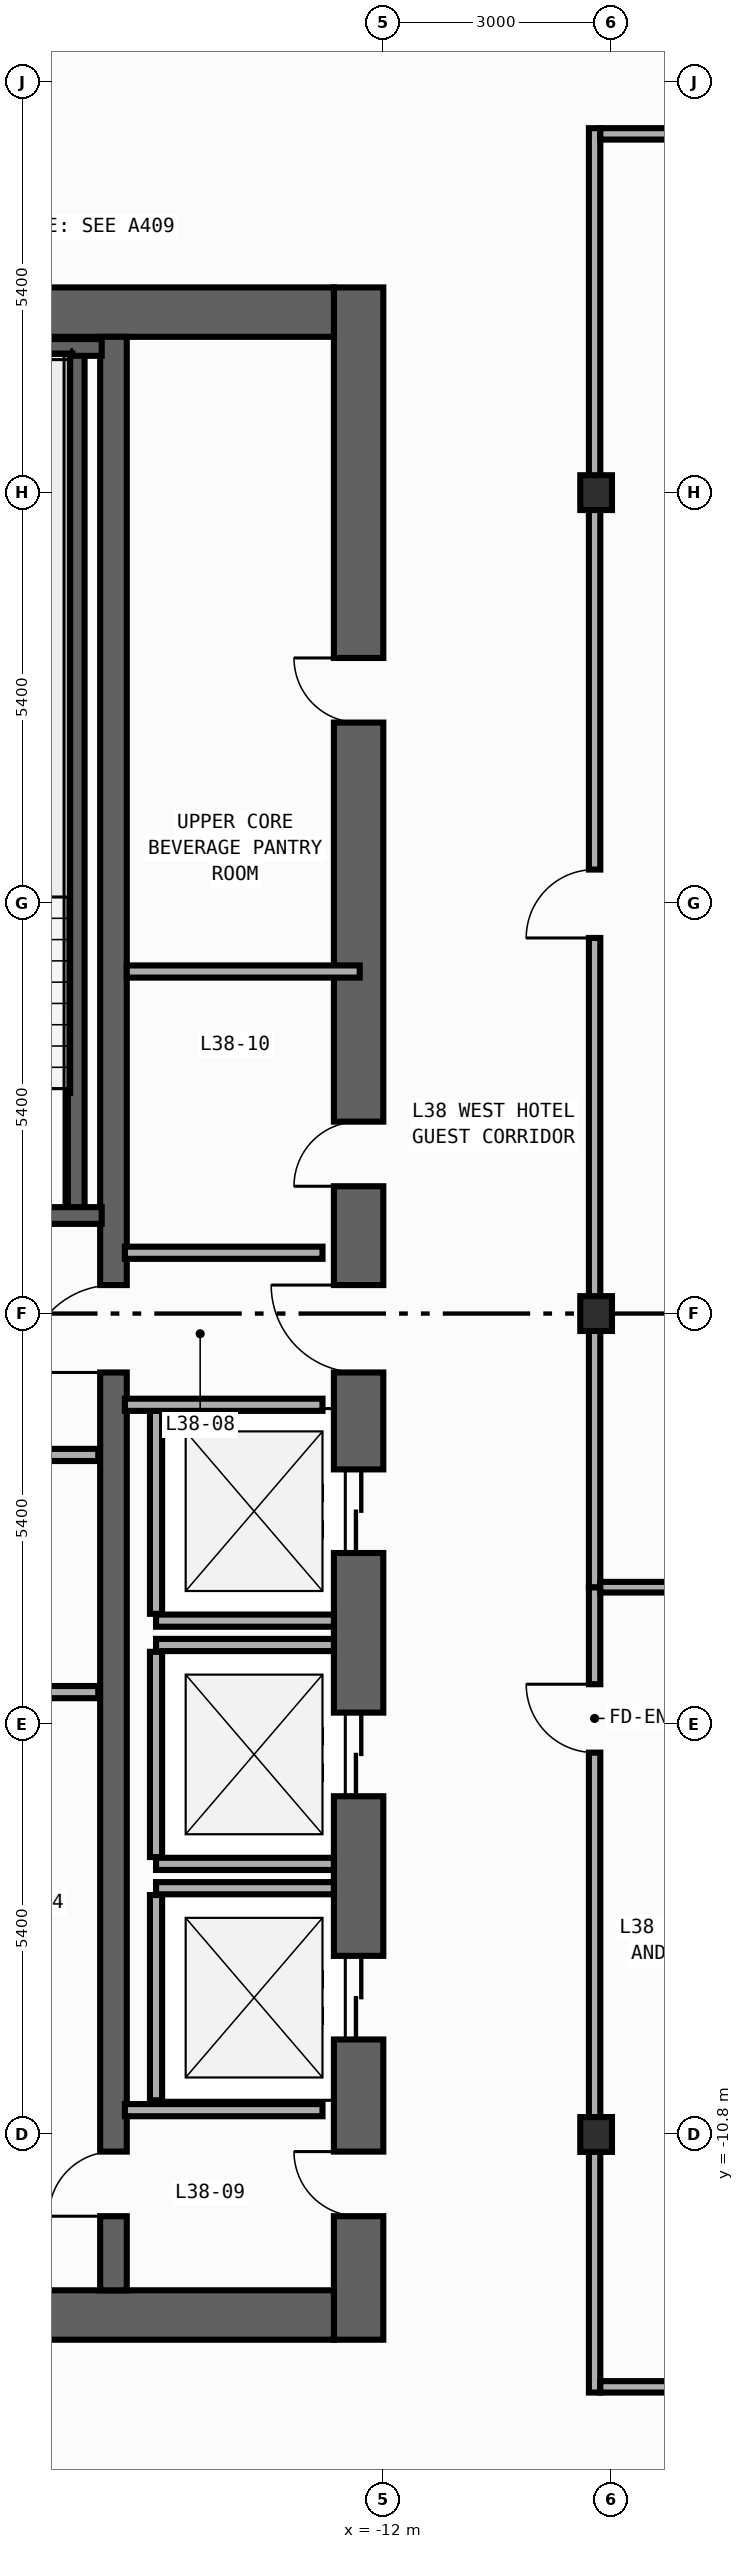
"""IFC4 building model, lengths in metres.
Left out: names, types, materials, properties, quantities, classifications, styles, units other than length and angle.
Written with IfcOpenShell. Run it as: python <this file> out.ifc"""

import sys

from ifc_helpers import new_model, si_unit, direction, frame, frame_2d, origin, origin_2d, place, context, subcontext, project, spatial, rectangle, i_section, extrude, element, fill, save


model = new_model("IFC4")
c1 = context("Model", 3, precision=1e-05, world=origin(), true_north=direction((0.0, 1.0)))
c2 = subcontext(c1, "Body", "Model", "MODEL_VIEW")
j1 = project(units=[si_unit("LENGTHUNIT", "METRE"), si_unit("PLANEANGLEUNIT", "RADIAN")], contexts=[c1])
p1 = place(None, origin())
s1 = spatial("IfcSite", under=j1, at=p1, CompositionType="ELEMENT")
p2 = place(p1, origin())
s2 = spatial("IfcBuilding", under=s1, at=p2, CompositionType="ELEMENT")
p3 = place(p2, frame((0.0, 0.0, 168.8)))
s3 = spatial("IfcBuildingStorey", under=s2, at=p3, CompositionType="ELEMENT", Elevation=168.8)
p4 = place(p3, frame((-12.325, -13.5, 0.0), z_axis=(0.0, 0.0, 1.0), x_axis=(0.0, 1.0, 0.0)))
e1 = element("IfcWall", 1, at=p4, inside=s3, PredefinedType="SHEAR", context=c2, shape_type="SweptSolid", body=[
    extrude(rectangle(XDim=27.0, YDim=0.65, at=frame_2d((13.5, 0.0))), origin(), (0.0, 0.0, 1.0), 3.54),
])
p5 = place(p4, frame((10.35, 0.0, 0.0)))
e2 = element("IfcOpeningElement", 2, at=p5, cuts=e1, PredefinedType="OPENING", context=c2, shape_type="SweptSolid", body=[
    extrude(rectangle(XDim=1.1, YDim=2.2, at=frame_2d((0.55, 1.1))), frame((0.0, 0.335, 0.0), z_axis=(0.0, -1.0, 0.0), x_axis=(1.0, 0.0, 0.0)), (0.0, 0.0, 1.0), 0.67),
])
p6 = place(p4, frame((7.15, 0.0, 0.0)))
e3 = element("IfcOpeningElement", 3, at=p6, cuts=e1, PredefinedType="OPENING", context=c2, shape_type="SweptSolid", body=[
    extrude(rectangle(XDim=1.1, YDim=2.2, at=frame_2d((0.55, 1.1))), frame((0.0, 0.335, 0.0), z_axis=(0.0, -1.0, 0.0), x_axis=(1.0, 0.0, 0.0)), (0.0, 0.0, 1.0), 0.67),
])
p7 = place(p4, frame((3.95, 0.0, 0.0)))
e4 = element("IfcOpeningElement", 4, at=p7, cuts=e1, PredefinedType="OPENING", context=c2, shape_type="SweptSolid", body=[
    extrude(rectangle(XDim=1.1, YDim=2.2, at=frame_2d((0.55, 1.1))), frame((0.0, 0.335, 0.0), z_axis=(0.0, -1.0, 0.0), x_axis=(1.0, 0.0, 0.0)), (0.0, 0.0, 1.0), 0.67),
])
p8 = place(p4, frame((15.175, 0.0, 0.0)))
e5 = element("IfcOpeningElement", 5, at=p8, cuts=e1, PredefinedType="OPENING", context=c2, shape_type="SweptSolid", body=[
    extrude(rectangle(XDim=0.85, YDim=2.1, at=frame_2d((0.425, 1.05))), frame((0.0, 0.335, 0.0), z_axis=(0.0, -1.0, 0.0), x_axis=(1.0, 0.0, 0.0)), (0.0, 0.0, 1.0), 0.67),
])
p9 = place(p4, frame((21.275, 0.0, 0.0)))
e6 = element("IfcOpeningElement", 6, at=p9, cuts=e1, PredefinedType="OPENING", context=c2, shape_type="SweptSolid", body=[
    extrude(rectangle(XDim=0.85, YDim=2.1, at=frame_2d((0.425, 1.05))), frame((0.0, 0.335, 0.0), z_axis=(0.0, -1.0, 0.0), x_axis=(1.0, 0.0, 0.0)), (0.0, 0.0, 1.0), 0.67),
])
p10 = place(p4, frame((12.725, 0.0, 0.0)))
e7 = element("IfcOpeningElement", 7, at=p10, cuts=e1, PredefinedType="OPENING", context=c2, shape_type="SweptSolid", body=[
    extrude(rectangle(XDim=1.15, YDim=2.2, at=frame_2d((0.575, 1.1))), frame((0.0, 0.335, 0.0), z_axis=(0.0, -1.0, 0.0), x_axis=(1.0, 0.0, 0.0)), (0.0, 0.0, 1.0), 0.67),
])
p11 = place(p4, frame((1.625, 0.0, 0.0)))
e8 = element("IfcOpeningElement", 8, at=p11, cuts=e1, PredefinedType="OPENING", context=c2, shape_type="SweptSolid", body=[
    extrude(rectangle(XDim=0.85, YDim=2.1, at=frame_2d((0.425, 1.05))), frame((0.0, 0.335, 0.0), z_axis=(0.0, -1.0, 0.0), x_axis=(1.0, 0.0, 0.0)), (0.0, 0.0, 1.0), 0.67),
])
for number, where, z_axis, x_axis in (
    (9, (-19.75, -13.175, 0.0), (0.0, 0.0, 1.0), (1.0, 0.0, 0.0)),
    (10, (-19.75, 13.175, 0.0), (0.0, 0.0, 1.0), (1.0, 0.0, 0.0)),
):
    element("IfcWall", number, at=place(p3, frame(where, z_axis=z_axis, x_axis=x_axis)), inside=s3, PredefinedType="SHEAR", context=c2, shape_type="SweptSolid", body=[
        extrude(rectangle(XDim=7.1, YDim=0.65, at=frame_2d((3.55, 0.0))), origin(), (0.0, 0.0, 1.0), 3.54),
    ])
p12 = place(p3, frame((-15.55, -12.85, 0.0), z_axis=(0.0, 0.0, 1.0), x_axis=(0.0, 1.0, 0.0)))
e11 = element("IfcWall", 11, at=p12, inside=s3, PredefinedType="SHEAR", context=c2, shape_type="SweptSolid", body=[
    extrude(rectangle(XDim=25.7, YDim=0.35, at=frame_2d((12.85, 0.0))), origin(), (0.0, 0.0, 1.0), 3.54),
])
p13 = place(p12, frame((12.075, 0.0, 0.0)))
e12 = element("IfcOpeningElement", 12, at=p13, cuts=e11, PredefinedType="OPENING", context=c2, shape_type="SweptSolid", body=[
    extrude(rectangle(XDim=1.15, YDim=2.2, at=frame_2d((0.575, 1.1))), frame((0.0, 0.185, 0.0), z_axis=(0.0, -1.0, 0.0), x_axis=(1.0, 0.0, 0.0)), (0.0, 0.0, 1.0), 0.37),
])
p14 = place(p12, frame((0.975, 0.0, 0.0)))
e13 = element("IfcOpeningElement", 13, at=p14, cuts=e11, PredefinedType="OPENING", context=c2, shape_type="SweptSolid", body=[
    extrude(rectangle(XDim=0.85, YDim=2.1, at=frame_2d((0.425, 1.05))), frame((0.0, 0.185, 0.0), z_axis=(0.0, -1.0, 0.0), x_axis=(1.0, 0.0, 0.0)), (0.0, 0.0, 1.0), 0.37),
])
p15 = place(p3, frame((-16.04, 1.29, 0.0), z_axis=(0.0, 0.0, 1.0), x_axis=(0.0, 1.0, 0.0)))
e14 = element("IfcWall", 14, at=p15, inside=s3, PredefinedType="SHEAR", context=c2, shape_type="SweptSolid", body=[
    extrude(rectangle(XDim=11.42, YDim=0.22, at=frame_2d((5.71, 0.0))), origin(), (0.0, 0.0, 1.0), 3.54),
])
p16 = place(p3, frame((-19.77, 12.71, 0.0), z_axis=(0.0, 0.0, 1.0), x_axis=(1.0, 0.0, 0.0)))
e15 = element("IfcWall", 15, at=p16, inside=s3, PredefinedType="SHEAR", context=c2, shape_type="SweptSolid", body=[
    extrude(rectangle(XDim=4.065, YDim=0.22, at=frame_2d((2.032, 0.0))), origin(), (0.0, 0.0, 1.0), 3.54),
])
p17 = place(p3, frame((-19.77, 1.29, 0.0), z_axis=(0.0, 0.0, 1.0), x_axis=(1.0, 0.0, 0.0)))
e16 = element("IfcWall", 16, at=p17, inside=s3, PredefinedType="SHEAR", context=c2, shape_type="SweptSolid", body=[
    extrude(rectangle(XDim=4.065, YDim=0.22, at=frame_2d((2.032, 0.0))), origin(), (0.0, 0.0, 1.0), 3.54),
])
p18 = place(p17, frame((1.08, 0.0, 0.0)))
e17 = element("IfcOpeningElement", 17, at=p18, cuts=e16, PredefinedType="OPENING", context=c2, shape_type="SweptSolid", body=[
    extrude(rectangle(XDim=1.1, YDim=2.2, at=frame_2d((0.55, 1.1))), frame((0.0, 0.12, 0.0), z_axis=(0.0, -1.0, 0.0), x_axis=(1.0, 0.0, 0.0)), (0.0, 0.0, 1.0), 0.24),
])
for number, where, z_axis, x_axis in (
    (18, (-9.2, -10.8, 0.0), (0.0, 0.0, 1.0), (1.0, 0.0, 0.0)),
    (19, (-9.2, 0.0, 0.0), (0.0, 0.0, 1.0), (1.0, 0.0, 0.0)),
    (20, (-9.2, 10.8, 0.0), (0.0, 0.0, 1.0), (1.0, 0.0, 0.0)),
):
    element("IfcColumn", number, at=place(p3, frame(where, z_axis=z_axis, x_axis=x_axis)), inside=s3, PredefinedType="COLUMN", context=c2, shape_type="SweptSolid", body=[
        extrude(i_section(OverallWidth=0.417, OverallDepth=0.458, WebThickness=0.03, FlangeThickness=0.05, FilletRadius=0.022, at=origin_2d()), origin(), (0.0, 0.0, 1.0), 3.8),
    ])
p19 = place(p3, frame((-14.99, -4.04, 0.0), z_axis=(0.0, 0.0, 1.0), x_axis=(1.0, 0.0, 0.0)))
e21 = element("IfcWall", 21, at=p19, inside=s3, PredefinedType="STANDARD", context=c2, shape_type="SweptSolid", body=[
    extrude(rectangle(XDim=2.34, YDim=0.16, at=frame_2d((1.17, 0.0))), origin(), (0.0, 0.0, 1.0), 3.54),
])
p20 = place(p3, frame((-14.99, -3.95, 0.0), z_axis=(0.0, 0.0, 1.0), x_axis=(0.0, 1.0, 0.0)))
e22 = element("IfcWall", 22, at=p20, inside=s3, PredefinedType="STANDARD", context=c2, shape_type="SweptSolid", body=[
    extrude(rectangle(XDim=2.7, YDim=0.16, at=frame_2d((1.35, 0.0))), origin(), (0.0, 0.0, 1.0), 3.54),
])
for number, where, z_axis, x_axis in (
    (23, (-14.99, -7.24, 0.0), (0.0, 0.0, 1.0), (1.0, 0.0, 0.0)),
    (24, (-14.99, -4.36, 0.0), (0.0, 0.0, 1.0), (1.0, 0.0, 0.0)),
):
    element("IfcWall", number, at=place(p3, frame(where, z_axis=z_axis, x_axis=x_axis)), inside=s3, PredefinedType="STANDARD", context=c2, shape_type="SweptSolid", body=[
        extrude(rectangle(XDim=2.34, YDim=0.16, at=frame_2d((1.17, 0.0))), origin(), (0.0, 0.0, 1.0), 3.54),
    ])
p21 = place(p3, frame((-14.99, -7.15, 0.0), z_axis=(0.0, 0.0, 1.0), x_axis=(0.0, 1.0, 0.0)))
e25 = element("IfcWall", 25, at=p21, inside=s3, PredefinedType="STANDARD", context=c2, shape_type="SweptSolid", body=[
    extrude(rectangle(XDim=2.7, YDim=0.16, at=frame_2d((1.35, 0.0))), origin(), (0.0, 0.0, 1.0), 3.54),
])
p22 = place(p3, frame((-14.99, -7.56, 0.0), z_axis=(0.0, 0.0, 1.0), x_axis=(1.0, 0.0, 0.0)))
e26 = element("IfcWall", 26, at=p22, inside=s3, PredefinedType="STANDARD", context=c2, shape_type="SweptSolid", body=[
    extrude(rectangle(XDim=2.34, YDim=0.16, at=frame_2d((1.17, 0.0))), origin(), (0.0, 0.0, 1.0), 3.54),
])
p23 = place(p3, frame((-14.99, -10.35, 0.0), z_axis=(0.0, 0.0, 1.0), x_axis=(0.0, 1.0, 0.0)))
e27 = element("IfcWall", 27, at=p23, inside=s3, PredefinedType="STANDARD", context=c2, shape_type="SweptSolid", body=[
    extrude(rectangle(XDim=2.7, YDim=0.16, at=frame_2d((1.35, 0.0))), origin(), (0.0, 0.0, 1.0), 3.54),
])
p24 = place(p3, frame((-19.55, -1.86, 0.0), z_axis=(0.0, 0.0, 1.0), x_axis=(1.0, 0.0, 0.0)))
e28 = element("IfcWall", 28, at=p24, inside=s3, PredefinedType="STANDARD", context=c2, shape_type="SweptSolid", body=[
    extrude(rectangle(XDim=3.8, YDim=0.16, at=frame_2d((1.9, 0.0))), origin(), (0.0, 0.0, 1.0), 3.54),
])
p25 = place(p24, frame((1.18, 0.0, 0.0)))
e29 = element("IfcOpeningElement", 29, at=p25, cuts=e28, PredefinedType="OPENING", context=c2, shape_type="SweptSolid", body=[
    extrude(rectangle(XDim=1.15, YDim=2.2, at=frame_2d((0.575, 1.1))), frame((0.0, 0.09, 0.0), z_axis=(0.0, -1.0, 0.0), x_axis=(1.0, 0.0, 0.0)), (0.0, 0.0, 1.0), 0.18),
])
p26 = place(p3, frame((-19.55, -4.98, 0.0), z_axis=(0.0, 0.0, 1.0), x_axis=(1.0, 0.0, 0.0)))
e30 = element("IfcWall", 30, at=p26, inside=s3, PredefinedType="STANDARD", context=c2, shape_type="SweptSolid", body=[
    extrude(rectangle(XDim=3.8, YDim=0.16, at=frame_2d((1.9, 0.0))), origin(), (0.0, 0.0, 1.0), 3.54),
])
for number, where, z_axis, x_axis in (
    (31, (-15.4, 0.8, 0.0), (0.0, 0.0, 1.0), (1.0, 0.0, 0.0)),
    (32, (-15.4, -1.2, 0.0), (0.0, 0.0, 1.0), (1.0, 0.0, 0.0)),
    (33, (-15.4, -10.48, 0.0), (0.0, 0.0, 1.0), (1.0, 0.0, 0.0)),
):
    element("IfcWall", number, at=place(p3, frame(where, z_axis=z_axis, x_axis=x_axis)), inside=s3, PredefinedType="STANDARD", context=c2, shape_type="SweptSolid", body=[
        extrude(rectangle(XDim=2.6, YDim=0.16, at=frame_2d((1.3, 0.0))), origin(), (0.0, 0.0, 1.0), 3.54),
    ])
p27 = place(p3, frame((-15.375, 4.5, 0.0), z_axis=(0.0, 0.0, 1.0), x_axis=(1.0, 0.0, 0.0)))
e34 = element("IfcWall", 34, at=p27, inside=s3, PredefinedType="PARTITIONING", context=c2, shape_type="SweptSolid", body=[
    extrude(rectangle(XDim=3.065, YDim=0.16, at=frame_2d((1.532, 0.0))), origin(), (0.0, 0.0, 1.0), 3.54),
])
p28 = place(p3, frame((-9.22, -14.195, 0.0), z_axis=(0.0, 0.0, 1.0), x_axis=(0.0, 1.0, 0.0)))
e35 = element("IfcWall", 35, at=p28, inside=s3, PredefinedType="PARTITIONING", context=c2, shape_type="SweptSolid", body=[
    extrude(rectangle(XDim=10.595, YDim=0.15, at=frame_2d((5.297, 0.0))), origin(), (0.0, 0.0, 1.0), 2.952),
])
p29 = place(p28, frame((8.419, 0.0, 0.0)))
e36 = element("IfcOpeningElement", 36, at=p29, cuts=e35, PredefinedType="OPENING", context=c2, shape_type="SweptSolid", body=[
    extrude(rectangle(XDim=0.9, YDim=2.15, at=frame_2d((0.45, 1.075))), frame((0.0, 0.085, 0.0), z_axis=(0.0, -1.0, 0.0), x_axis=(1.0, 0.0, 0.0)), (0.0, 0.0, 1.0), 0.17),
])
p30 = place(p3, frame((-9.22, -3.6, 0.0), z_axis=(0.0, 0.0, 1.0), x_axis=(0.0, 1.0, 0.0)))
e37 = element("IfcWall", 37, at=p30, inside=s3, PredefinedType="PARTITIONING", context=c2, shape_type="SweptSolid", body=[
    extrude(rectangle(XDim=19.195, YDim=0.15, at=frame_2d((9.598, 0.0))), origin(), (0.0, 0.0, 1.0), 2.952),
])
p31 = place(p30, frame((8.542, 0.0, 0.0)))
e38 = element("IfcOpeningElement", 38, at=p31, cuts=e37, PredefinedType="OPENING", context=c2, shape_type="SweptSolid", body=[
    extrude(rectangle(XDim=0.9, YDim=2.15, at=frame_2d((0.45, 1.075))), frame((0.0, 0.085, 0.0), z_axis=(0.0, -1.0, 0.0), x_axis=(1.0, 0.0, 0.0)), (0.0, 0.0, 1.0), 0.17),
])
p32 = place(p3, frame((-9.145, 15.52, 0.0), z_axis=(0.0, 0.0, 1.0), x_axis=(1.0, 0.0, 0.0)))
e39 = element("IfcWall", 39, at=p32, inside=s3, PredefinedType="PARTITIONING", context=c2, shape_type="SweptSolid", body=[
    extrude(rectangle(XDim=18.29, YDim=0.15, at=frame_2d((9.145, 0.0))), origin(), (0.0, 0.0, 1.0), 3.54),
])
p33 = place(p32, frame((15.725, 0.0, 0.0)))
e40 = element("IfcOpeningElement", 40, at=p33, cuts=e39, PredefinedType="OPENING", context=c2, shape_type="SweptSolid", body=[
    extrude(rectangle(XDim=0.9, YDim=2.15, at=frame_2d((0.45, 1.075))), frame((0.0, 0.085, 0.0), z_axis=(0.0, -1.0, 0.0), x_axis=(1.0, 0.0, 0.0)), (0.0, 0.0, 1.0), 0.17),
])
p34 = place(p3, frame((-9.145, -14.12, 0.0), z_axis=(0.0, 0.0, 1.0), x_axis=(1.0, 0.0, 0.0)))
e41 = element("IfcWall", 41, at=p34, inside=s3, PredefinedType="PARTITIONING", context=c2, shape_type="SweptSolid", body=[
    extrude(rectangle(XDim=3.025, YDim=0.15, at=frame_2d((1.512, 0.0))), origin(), (0.0, 0.0, 1.0), 3.54),
])
p35 = place(p34, frame((1.665, 0.0, 0.0)))
e42 = element("IfcOpeningElement", 42, at=p35, cuts=e41, PredefinedType="OPENING", context=c2, shape_type="SweptSolid", body=[
    extrude(rectangle(XDim=0.9, YDim=2.15, at=frame_2d((0.45, 1.075))), frame((0.0, 0.085, 0.0), z_axis=(0.0, -1.0, 0.0), x_axis=(1.0, 0.0, 0.0)), (0.0, 0.0, 1.0), 0.17),
])
p36 = place(p3, frame((-9.145, -3.6, 0.0), z_axis=(0.0, 0.0, 1.0), x_axis=(1.0, 0.0, 0.0)))
e43 = element("IfcWall", 43, at=p36, inside=s3, PredefinedType="PARTITIONING", context=c2, shape_type="SweptSolid", body=[
    extrude(rectangle(XDim=3.025, YDim=0.14, at=frame_2d((1.512, 0.0))), origin(), (0.0, 0.0, 1.0), 3.54),
])
p37 = place(p5, origin())
e44 = element("IfcDoor", 44, at=p37, inside=s3, OperationType="DOUBLE_DOOR_SLIDING", PredefinedType="DOOR", context=c2, shape_type="SweptSolid", body=[
    extrude(rectangle(XDim=1.1, YDim=2.2, at=frame_2d((0.55, 1.1))), frame((0.0, 0.025, 0.0), z_axis=(0.0, -1.0, 0.0), x_axis=(1.0, 0.0, 0.0)), (0.0, 0.0, 1.0), 0.05),
])
fill(e2, e44)
p38 = place(p6, origin())
e45 = element("IfcDoor", 45, at=p38, inside=s3, OperationType="DOUBLE_DOOR_SLIDING", PredefinedType="DOOR", context=c2, shape_type="SweptSolid", body=[
    extrude(rectangle(XDim=1.1, YDim=2.2, at=frame_2d((0.55, 1.1))), frame((0.0, 0.025, 0.0), z_axis=(0.0, -1.0, 0.0), x_axis=(1.0, 0.0, 0.0)), (0.0, 0.0, 1.0), 0.05),
])
fill(e3, e45)
p39 = place(p7, origin())
e46 = element("IfcDoor", 46, at=p39, inside=s3, OperationType="DOUBLE_DOOR_SLIDING", PredefinedType="DOOR", context=c2, shape_type="SweptSolid", body=[
    extrude(rectangle(XDim=1.1, YDim=2.2, at=frame_2d((0.55, 1.1))), frame((0.0, 0.025, 0.0), z_axis=(0.0, -1.0, 0.0), x_axis=(1.0, 0.0, 0.0)), (0.0, 0.0, 1.0), 0.05),
])
fill(e4, e46)
p40 = place(p8, origin())
e47 = element("IfcDoor", 47, at=p40, inside=s3, OperationType="SINGLE_SWING_LEFT", PredefinedType="DOOR", context=c2, shape_type="SweptSolid", body=[
    extrude(rectangle(XDim=0.85, YDim=2.1, at=frame_2d((0.425, 1.05))), frame((0.0, 0.025, 0.0), z_axis=(0.0, -1.0, 0.0), x_axis=(1.0, 0.0, 0.0)), (0.0, 0.0, 1.0), 0.05),
])
fill(e5, e47)
p41 = place(p9, origin())
e48 = element("IfcDoor", 48, at=p41, inside=s3, OperationType="SINGLE_SWING_RIGHT", PredefinedType="DOOR", context=c2, shape_type="SweptSolid", body=[
    extrude(rectangle(XDim=0.85, YDim=2.1, at=frame_2d((0.425, 1.05))), frame((0.0, 0.025, 0.0), z_axis=(0.0, -1.0, 0.0), x_axis=(1.0, 0.0, 0.0)), (0.0, 0.0, 1.0), 0.05),
])
fill(e6, e48)
p42 = place(p10, origin())
e49 = element("IfcDoor", 49, at=p42, inside=s3, OperationType="SINGLE_SWING_RIGHT", PredefinedType="DOOR", context=c2, shape_type="SweptSolid", body=[
    extrude(rectangle(XDim=1.15, YDim=2.2, at=frame_2d((0.575, 1.1))), frame((0.0, 0.025, 0.0), z_axis=(0.0, -1.0, 0.0), x_axis=(1.0, 0.0, 0.0)), (0.0, 0.0, 1.0), 0.05),
])
fill(e7, e49)
p43 = place(p13, origin())
e50 = element("IfcDoor", 50, at=p43, inside=s3, OperationType="SINGLE_SWING_LEFT", PredefinedType="DOOR", context=c2, shape_type="SweptSolid", body=[
    extrude(rectangle(XDim=1.15, YDim=2.2, at=frame_2d((0.575, 1.1))), frame((0.0, 0.025, 0.0), z_axis=(0.0, -1.0, 0.0), x_axis=(1.0, 0.0, 0.0)), (0.0, 0.0, 1.0), 0.05),
])
fill(e12, e50)
p44 = place(p11, origin())
e51 = element("IfcDoor", 51, at=p44, inside=s3, OperationType="SINGLE_SWING_RIGHT", PredefinedType="DOOR", context=c2, shape_type="SweptSolid", body=[
    extrude(rectangle(XDim=0.85, YDim=2.1, at=frame_2d((0.425, 1.05))), frame((0.0, 0.025, 0.0), z_axis=(0.0, -1.0, 0.0), x_axis=(1.0, 0.0, 0.0)), (0.0, 0.0, 1.0), 0.05),
])
fill(e8, e51)
p45 = place(p14, origin())
e52 = element("IfcDoor", 52, at=p45, inside=s3, OperationType="SINGLE_SWING_LEFT", PredefinedType="DOOR", context=c2, shape_type="SweptSolid", body=[
    extrude(rectangle(XDim=0.85, YDim=2.1, at=frame_2d((0.425, 1.05))), frame((0.0, 0.025, 0.0), z_axis=(0.0, -1.0, 0.0), x_axis=(1.0, 0.0, 0.0)), (0.0, 0.0, 1.0), 0.05),
])
fill(e13, e52)
p46 = place(p29, origin())
e53 = element("IfcDoor", 53, at=p46, inside=s3, OperationType="SINGLE_SWING_RIGHT", PredefinedType="DOOR", context=c2, shape_type="SweptSolid", body=[
    extrude(rectangle(XDim=0.9, YDim=2.15, at=frame_2d((0.45, 1.075))), frame((0.0, 0.025, 0.0), z_axis=(0.0, -1.0, 0.0), x_axis=(1.0, 0.0, 0.0)), (0.0, 0.0, 1.0), 0.05),
])
fill(e36, e53)
p47 = place(p31, origin())
e54 = element("IfcDoor", 54, at=p47, inside=s3, OperationType="SINGLE_SWING_LEFT", PredefinedType="DOOR", context=c2, shape_type="SweptSolid", body=[
    extrude(rectangle(XDim=0.9, YDim=2.15, at=frame_2d((0.45, 1.075))), frame((0.0, 0.025, 0.0), z_axis=(0.0, -1.0, 0.0), x_axis=(1.0, 0.0, 0.0)), (0.0, 0.0, 1.0), 0.05),
])
fill(e38, e54)
save(model, sys.argv[1])
